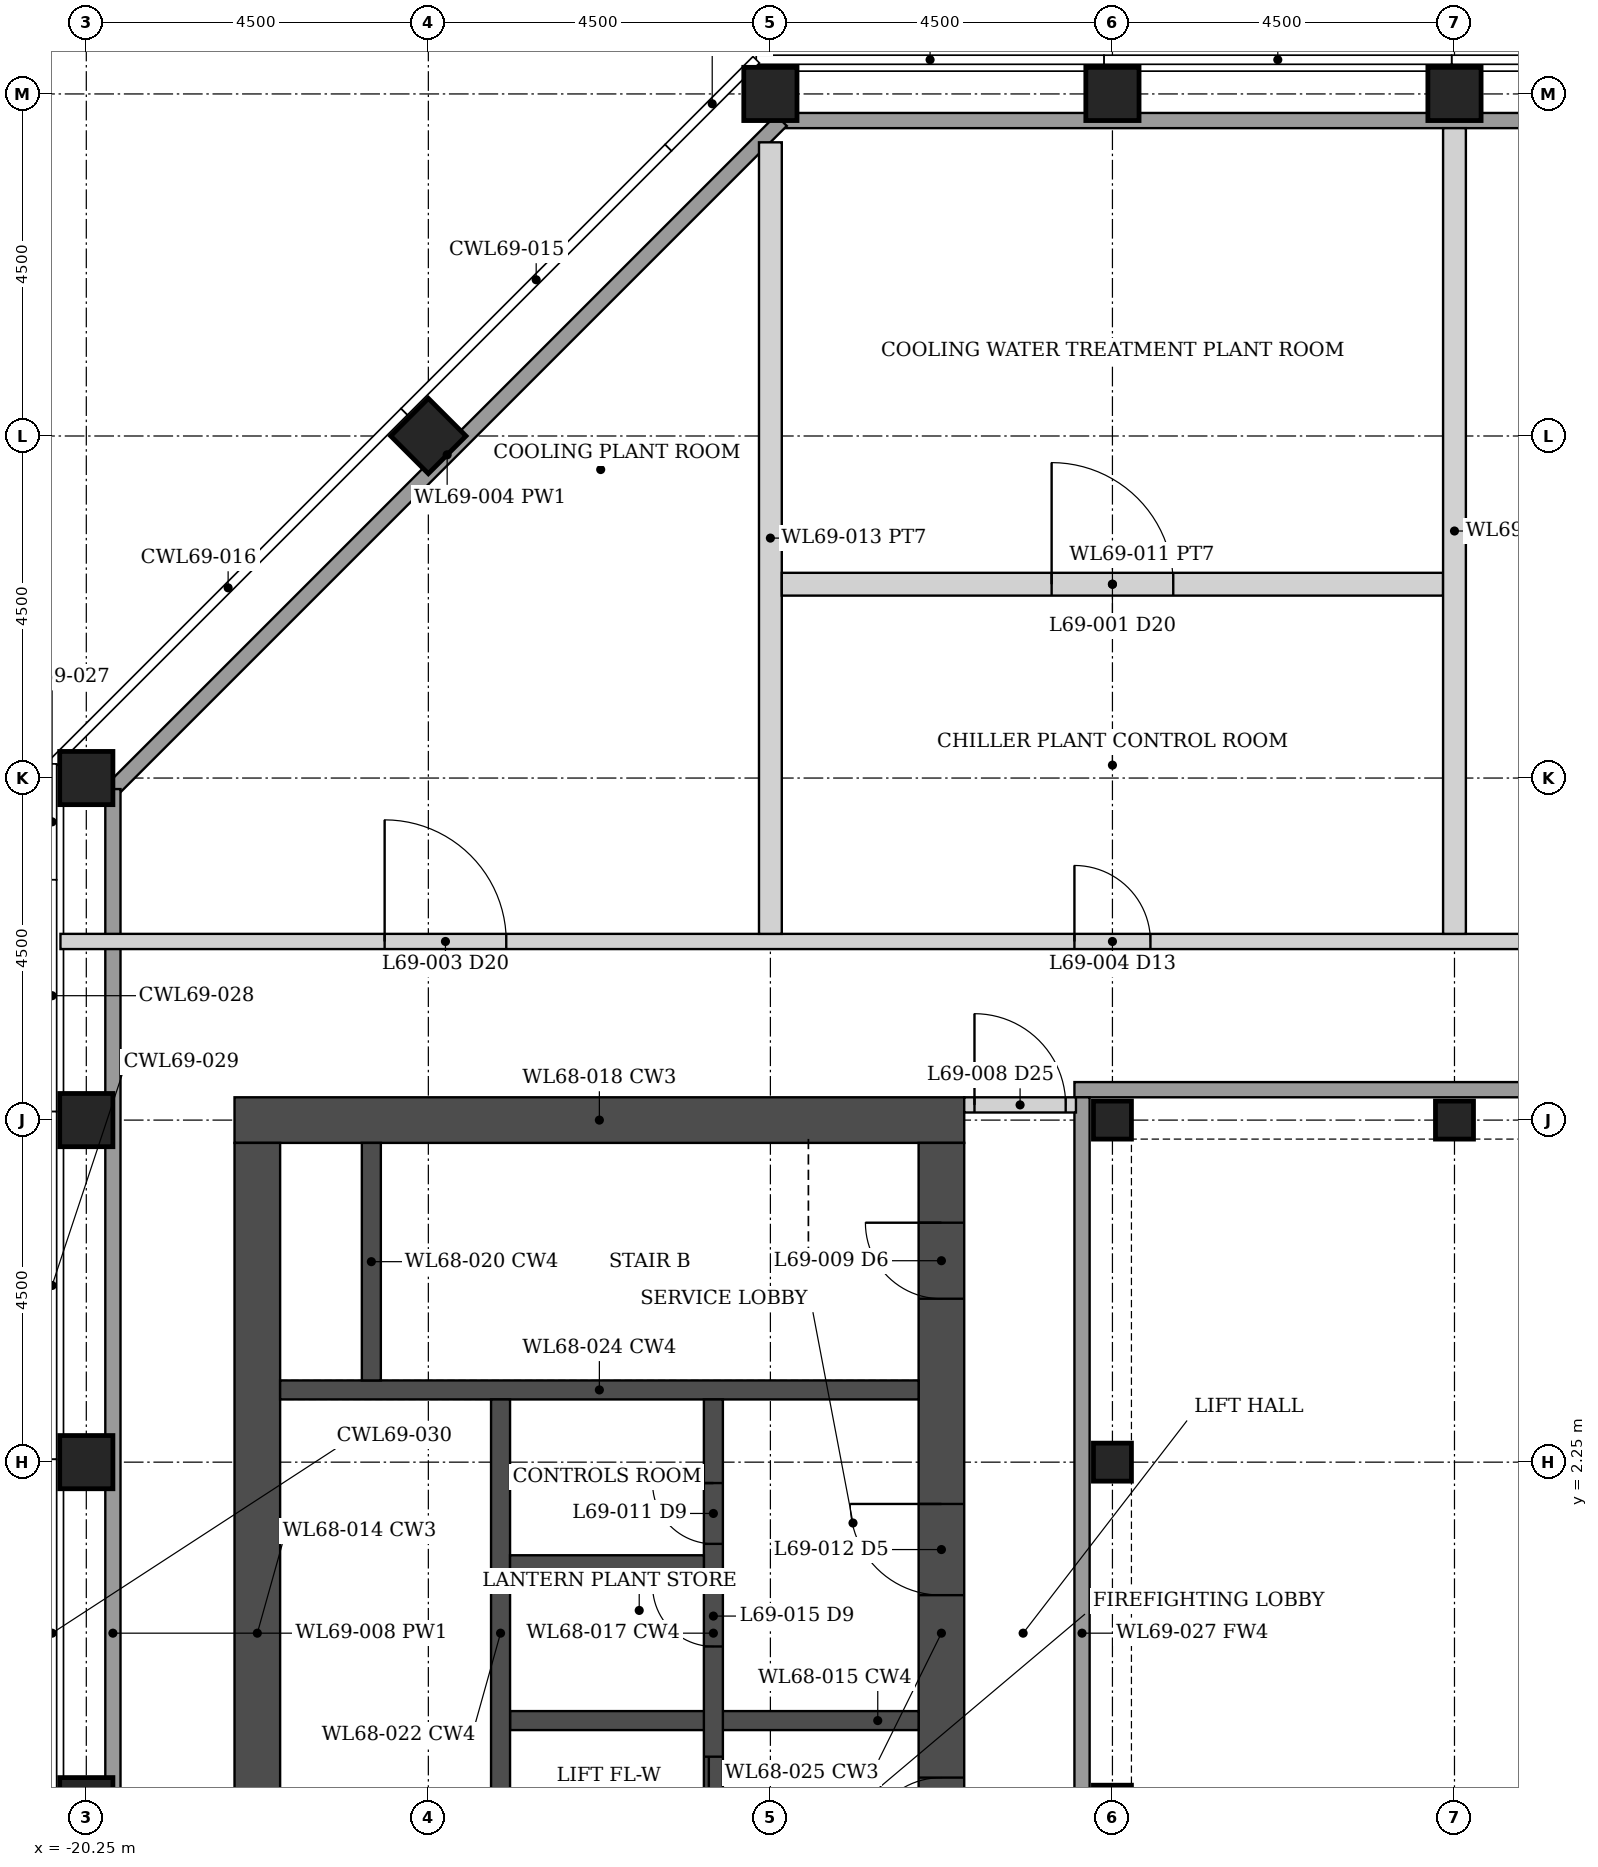
"""IFC4 building model, lengths in metres.
Left out: names, types, materials, properties, quantities, classifications, styles, units other than length and angle.
Written with IfcOpenShell. Run it as: python <this file> out.ifc"""

import sys

from ifc_helpers import new_model, si_unit, direction, frame, frame_2d, origin, origin_2d, place, context, subcontext, project, spatial, rectangle, hollow_rectangle, extrude, element, fill, save


model = new_model("IFC4")
c1 = context("Model", 3, precision=1e-05, world=origin(), true_north=direction((0.0, 1.0)))
c2 = subcontext(c1, "Body", "Model", "MODEL_VIEW")
j1 = project(units=[si_unit("LENGTHUNIT", "METRE"), si_unit("PLANEANGLEUNIT", "RADIAN")], contexts=[c1])
p1 = place(None, origin())
s1 = spatial("IfcSite", under=j1, at=p1, CompositionType="ELEMENT")
p2 = place(p1, origin())
s2 = spatial("IfcBuilding", under=s1, at=p2, CompositionType="ELEMENT")
p3 = place(p2, frame((0.0, 0.0, 268.05)))
s3 = spatial("IfcBuildingStorey", under=s2, at=p3, CompositionType="ELEMENT", Elevation=268.05)
for number, where, z_axis, x_axis in (
    (1, (-11.25, 20.25, 0.0), (0.0, 0.0, 1.0), (0.0, 1.0, 0.0)),
    (2, (-6.75, 20.25, 0.0), (0.0, 0.0, 1.0), (0.0, 1.0, 0.0)),
    (3, (-2.25, 20.25, 0.0), (0.0, 0.0, 1.0), (0.0, 1.0, 0.0)),
    (4, (-20.25, -2.25, 0.0), (0.0, 0.0, 1.0), (1.0, 0.0, 0.0)),
    (5, (-20.25, 2.25, 0.0), (0.0, 0.0, 1.0), (1.0, 0.0, 0.0)),
    (6, (-20.25, 6.75, 0.0), (0.0, 0.0, 1.0), (1.0, 0.0, 0.0)),
    (7, (-20.25, 11.25, 0.0), (0.0, 0.0, 1.0), (1.0, 0.0, 0.0)),
    (8, (-15.75, 15.75, 0.0), (0.0, 0.0, 1.0), (0.707, -0.707, 0.0)),
):
    element("IfcColumn", number, at=place(p3, frame(where, z_axis=z_axis, x_axis=x_axis)), inside=s3, PredefinedType="COLUMN", context=c2, shape_type="SweptSolid", body=[
        extrude(hollow_rectangle(XDim=0.7, YDim=0.7, WallThickness=0.035, at=origin_2d()), origin(), (0.0, 0.0, 1.0), 6.0),
    ])
for number, where, z_axis, x_axis in (
    (9, (-6.75, -2.25, 0.0), (0.0, 0.0, 1.0), (1.0, 0.0, 0.0)),
    (10, (-6.75, 2.25, 0.0), (0.0, 0.0, 1.0), (1.0, 0.0, 0.0)),
    (11, (-6.75, 6.75, 0.0), (0.0, 0.0, 1.0), (1.0, 0.0, 0.0)),
    (12, (-2.25, 6.75, 0.0), (0.0, 0.0, 1.0), (1.0, 0.0, 0.0)),
):
    element("IfcColumn", number, at=place(p3, frame(where, z_axis=z_axis, x_axis=x_axis)), inside=s3, PredefinedType="COLUMN", context=c2, shape_type="SweptSolid", body=[
        extrude(hollow_rectangle(XDim=0.5, YDim=0.5, WallThickness=0.025, at=origin_2d()), origin(), (0.0, 0.0, 1.0), 6.0),
    ])
p4 = place(p3, frame((-8.7, 6.75, 0.0), z_axis=(0.0, 0.0, 1.0), x_axis=(-1.0, 0.0, 0.0)))
e13 = element("IfcWall", 13, at=p4, inside=s3, PredefinedType="SHEAR", context=c2, shape_type="SweptSolid", body=[
    extrude(rectangle(XDim=9.6, YDim=0.6, at=frame_2d((4.8, 0.0))), origin(), (0.0, 0.0, 1.0), 6.0),
])
p5 = place(p3, frame((-9.0, -6.45, 0.0), z_axis=(0.0, 0.0, 1.0), x_axis=(0.0, 1.0, 0.0)))
e14 = element("IfcWall", 14, at=p5, inside=s3, PredefinedType="SHEAR", context=c2, shape_type="SweptSolid", body=[
    extrude(rectangle(XDim=12.9, YDim=0.6, at=frame_2d((6.45, 0.0))), origin(), (0.0, 0.0, 1.0), 6.0),
])
p6 = place(p5, frame((3.55, 0.0, 0.0)))
e15 = element("IfcOpeningElement", 15, at=p6, cuts=e14, PredefinedType="OPENING", context=c2, shape_type="SweptSolid", body=[
    extrude(rectangle(XDim=1.0, YDim=2.1, at=frame_2d((0.5, 1.05))), frame((0.0, 0.31, 0.0), z_axis=(0.0, -1.0, 0.0), x_axis=(1.0, 0.0, 0.0)), (0.0, 0.0, 1.0), 0.62),
])
p7 = place(p5, frame((6.95, 0.0, 0.0)))
e16 = element("IfcOpeningElement", 16, at=p7, cuts=e14, PredefinedType="OPENING", context=c2, shape_type="SweptSolid", body=[
    extrude(rectangle(XDim=1.2, YDim=2.1, at=frame_2d((0.6, 1.05))), frame((0.0, 0.31, 0.0), z_axis=(0.0, -1.0, 0.0), x_axis=(1.0, 0.0, 0.0)), (0.0, 0.0, 1.0), 0.62),
])
p8 = place(p5, frame((10.85, 0.0, 0.0)))
e17 = element("IfcOpeningElement", 17, at=p8, cuts=e14, PredefinedType="OPENING", context=c2, shape_type="SweptSolid", body=[
    extrude(rectangle(XDim=1.0, YDim=2.1, at=frame_2d((0.5, 1.05))), frame((0.0, 0.31, 0.0), z_axis=(0.0, -1.0, 0.0), x_axis=(1.0, 0.0, 0.0)), (0.0, 0.0, 1.0), 0.62),
])
p9 = place(p3, frame((-18.0, -6.45, 0.0), z_axis=(0.0, 0.0, 1.0), x_axis=(0.0, 1.0, 0.0)))
e18 = element("IfcWall", 18, at=p9, inside=s3, PredefinedType="SHEAR", context=c2, shape_type="SweptSolid", body=[
    extrude(rectangle(XDim=12.9, YDim=0.6, at=frame_2d((6.45, 0.0))), origin(), (0.0, 0.0, 1.0), 6.0),
])
p10 = place(p3, frame((-9.3, 3.2, 0.0), z_axis=(0.0, 0.0, 1.0), x_axis=(-1.0, 0.0, 0.0)))
e19 = element("IfcWall", 19, at=p10, inside=s3, PredefinedType="SHEAR", context=c2, shape_type="SweptSolid", body=[
    extrude(rectangle(XDim=8.4, YDim=0.25, at=frame_2d((4.2, 0.0))), origin(), (0.0, 0.0, 1.0), 6.0),
])
p11 = place(p3, frame((-16.5, 3.325, 0.0), z_axis=(0.0, 0.0, 1.0), x_axis=(0.0, 1.0, 0.0)))
e20 = element("IfcWall", 20, at=p11, inside=s3, PredefinedType="SHEAR", context=c2, shape_type="SweptSolid", body=[
    extrude(rectangle(XDim=3.125, YDim=0.25, at=frame_2d((1.562, 0.0))), origin(), (0.0, 0.0, 1.0), 6.0),
])
p12 = place(p3, frame((-9.3, -1.15, 0.0), z_axis=(0.0, 0.0, 1.0), x_axis=(-1.0, 0.0, 0.0)))
e21 = element("IfcWall", 21, at=p12, inside=s3, PredefinedType="SHEAR", context=c2, shape_type="SweptSolid", body=[
    extrude(rectangle(XDim=5.375, YDim=0.25, at=frame_2d((2.688, 0.0))), origin(), (0.0, 0.0, 1.0), 6.0),
])
p13 = place(p3, frame((-12.0, -3.075, 0.0), z_axis=(0.0, 0.0, 1.0), x_axis=(0.0, 1.0, 0.0)))
e22 = element("IfcWall", 22, at=p13, inside=s3, PredefinedType="SHEAR", context=c2, shape_type="SweptSolid", body=[
    extrude(rectangle(XDim=6.15, YDim=0.25, at=frame_2d((3.075, 0.0))), origin(), (0.0, 0.0, 1.0), 6.0),
])
p14 = place(p13, frame((2.9, 0.0, 0.0)))
e23 = element("IfcOpeningElement", 23, at=p14, cuts=e22, PredefinedType="OPENING", context=c2, shape_type="SweptSolid", body=[
    extrude(rectangle(XDim=0.8, YDim=2.1, at=frame_2d((0.4, 1.05))), frame((0.0, 0.135, 0.0), z_axis=(0.0, -1.0, 0.0), x_axis=(1.0, 0.0, 0.0)), (0.0, 0.0, 1.0), 0.27),
])
p15 = place(p13, frame((4.25, 0.0, 0.0)))
e24 = element("IfcOpeningElement", 24, at=p15, cuts=e22, PredefinedType="OPENING", context=c2, shape_type="SweptSolid", body=[
    extrude(rectangle(XDim=0.8, YDim=2.1, at=frame_2d((0.4, 1.05))), frame((0.0, 0.135, 0.0), z_axis=(0.0, -1.0, 0.0), x_axis=(1.0, 0.0, 0.0)), (0.0, 0.0, 1.0), 0.27),
])
p16 = place(p13, frame((0.35, 0.0, 0.0)))
e25 = element("IfcOpeningElement", 25, at=p16, cuts=e22, PredefinedType="OPENING", context=c2, shape_type="SweptSolid", body=[
    extrude(rectangle(XDim=1.1, YDim=2.1, at=frame_2d((0.55, 1.05))), frame((0.0, 0.135, 0.0), z_axis=(0.0, -1.0, 0.0), x_axis=(1.0, 0.0, 0.0)), (0.0, 0.0, 1.0), 0.27),
])
p17 = place(p3, frame((-14.8, -3.075, 0.0), z_axis=(0.0, 0.0, 1.0), x_axis=(0.0, 1.0, 0.0)))
e26 = element("IfcWall", 26, at=p17, inside=s3, PredefinedType="SHEAR", context=c2, shape_type="SweptSolid", body=[
    extrude(rectangle(XDim=6.15, YDim=0.25, at=frame_2d((3.075, 0.0))), origin(), (0.0, 0.0, 1.0), 6.0),
])
p18 = place(p3, frame((-12.125, 0.9, 0.0), z_axis=(0.0, 0.0, 1.0), x_axis=(-1.0, 0.0, 0.0)))
e27 = element("IfcWall", 27, at=p18, inside=s3, PredefinedType="SHEAR", context=c2, shape_type="SweptSolid", body=[
    extrude(rectangle(XDim=2.55, YDim=0.25, at=frame_2d((1.275, 0.0))), origin(), (0.0, 0.0, 1.0), 6.0),
])
p19 = place(p3, frame((-7.25, 7.15, 0.0), z_axis=(0.0, 0.0, 1.0), x_axis=(1.0, 0.0, 0.0)))
e28 = element("IfcWall", 28, at=p19, inside=s3, PredefinedType="SOLIDWALL", context=c2, shape_type="SweptSolid", body=[
    extrude(rectangle(XDim=14.5, YDim=0.2, at=frame_2d((7.25, 0.0))), origin(), (0.0, 0.0, 1.0), 4.829),
])
p20 = place(p3, frame((-7.15, -7.05, 0.0), z_axis=(0.0, 0.0, 1.0), x_axis=(0.0, 1.0, 0.0)))
e29 = element("IfcWall", 29, at=p20, inside=s3, PredefinedType="SOLIDWALL", context=c2, shape_type="SweptSolid", body=[
    extrude(rectangle(XDim=14.1, YDim=0.2, at=frame_2d((7.05, 0.0))), origin(), (0.0, 0.0, 1.0), 4.829),
])
p21 = place(p3, frame((-11.105, 19.9, 6.0), z_axis=(0.0, 0.0, 1.0), x_axis=(1.0, 0.0, 0.0)))
e30 = element("IfcWall", 30, at=p21, inside=s3, PredefinedType="PARAPET", context=c2, shape_type="SweptSolid", body=[
    extrude(rectangle(XDim=22.21, YDim=0.2, at=frame_2d((11.105, 0.0))), origin(), (0.0, 0.0, 1.0), 1.1),
])
p22 = place(p3, frame((-19.9, 11.105, 6.0), z_axis=(0.0, 0.0, 1.0), x_axis=(0.707106781187, 0.707106781187, 0.0)))
e31 = element("IfcWall", 31, at=p22, inside=s3, PredefinedType="PARAPET", context=c2, shape_type="SweptSolid", body=[
    extrude(rectangle(XDim=12.438, YDim=0.2, at=frame_2d((6.219, 0.0))), origin(), (0.0, 0.0, 1.0), 1.1),
])
p23 = place(p3, frame((-19.9, -11.105, 6.0), z_axis=(0.0, 0.0, 1.0), x_axis=(0.0, 1.0, 0.0)))
e32 = element("IfcWall", 32, at=p23, inside=s3, PredefinedType="PARAPET", context=c2, shape_type="SweptSolid", body=[
    extrude(rectangle(XDim=22.21, YDim=0.2, at=frame_2d((11.105, 0.0))), origin(), (0.0, 0.0, 1.0), 1.1),
])
p24 = place(p3, frame((-8.7, 6.95, 0.0), z_axis=(0.0, 0.0, 1.0), x_axis=(1.0, 0.0, 0.0)))
e33 = element("IfcWall", 33, at=p24, inside=s3, PredefinedType="PARTITIONING", context=c2, shape_type="SweptSolid", body=[
    extrude(rectangle(XDim=1.47, YDim=0.2, at=frame_2d((0.735, 0.0))), origin(), (0.0, 0.0, 1.0), 4.829),
])
p25 = place(p24, frame((0.135, 0.0, 0.0)))
e34 = element("IfcOpeningElement", 34, at=p25, cuts=e33, PredefinedType="OPENING", context=c2, shape_type="SweptSolid", body=[
    extrude(rectangle(XDim=1.2, YDim=2.1, at=frame_2d((0.6, 1.05))), frame((0.0, 0.11, 0.0), z_axis=(0.0, -1.0, 0.0), x_axis=(1.0, 0.0, 0.0)), (0.0, 0.0, 1.0), 0.22),
])
p26 = place(p3, frame((-20.59, 9.1, 0.0), z_axis=(0.0, 0.0, 1.0), x_axis=(1.0, 0.0, 0.0)))
e35 = element("IfcWall", 35, at=p26, inside=s3, PredefinedType="PARTITIONING", context=c2, shape_type="SweptSolid", body=[
    extrude(rectangle(XDim=41.18, YDim=0.2, at=frame_2d((20.59, 0.0))), origin(), (0.0, 0.0, 1.0), 4.829),
])
p27 = place(p26, frame((4.265, 0.0, 0.0)))
e36 = element("IfcOpeningElement", 36, at=p27, cuts=e35, PredefinedType="OPENING", context=c2, shape_type="SweptSolid", body=[
    extrude(rectangle(XDim=1.6, YDim=2.4, at=frame_2d((0.8, 1.2))), frame((0.0, 0.11, 0.0), z_axis=(0.0, -1.0, 0.0), x_axis=(1.0, 0.0, 0.0)), (0.0, 0.0, 1.0), 0.22),
])
p28 = place(p26, frame((13.34, 0.0, 0.0)))
e37 = element("IfcOpeningElement", 37, at=p28, cuts=e35, PredefinedType="OPENING", context=c2, shape_type="SweptSolid", body=[
    extrude(rectangle(XDim=1.0, YDim=2.1, at=frame_2d((0.5, 1.05))), frame((0.0, 0.11, 0.0), z_axis=(0.0, -1.0, 0.0), x_axis=(1.0, 0.0, 0.0)), (0.0, 0.0, 1.0), 0.22),
])
p29 = place(p26, frame((22.04, 0.0, 0.0)))
e38 = element("IfcOpeningElement", 38, at=p29, cuts=e35, PredefinedType="OPENING", context=c2, shape_type="SweptSolid", body=[
    extrude(rectangle(XDim=1.6, YDim=2.4, at=frame_2d((0.8, 1.2))), frame((0.0, 0.11, 0.0), z_axis=(0.0, -1.0, 0.0), x_axis=(1.0, 0.0, 0.0)), (0.0, 0.0, 1.0), 0.22),
])
p30 = place(p26, frame((29.09, 0.0, 0.0)))
e39 = element("IfcOpeningElement", 39, at=p30, cuts=e35, PredefinedType="OPENING", context=c2, shape_type="SweptSolid", body=[
    extrude(rectangle(XDim=1.0, YDim=2.1, at=frame_2d((0.5, 1.05))), frame((0.0, 0.11, 0.0), z_axis=(0.0, -1.0, 0.0), x_axis=(1.0, 0.0, 0.0)), (0.0, 0.0, 1.0), 0.22),
])
p31 = place(p26, frame((35.315, 0.0, 0.0)))
e40 = element("IfcOpeningElement", 40, at=p31, cuts=e35, PredefinedType="OPENING", context=c2, shape_type="SweptSolid", body=[
    extrude(rectangle(XDim=1.6, YDim=2.4, at=frame_2d((0.8, 1.2))), frame((0.0, 0.11, 0.0), z_axis=(0.0, -1.0, 0.0), x_axis=(1.0, 0.0, 0.0)), (0.0, 0.0, 1.0), 0.22),
])
p32 = place(p3, frame((-11.25, 9.2, 0.0), z_axis=(0.0, 0.0, 1.0), x_axis=(0.0, 1.0, 0.0)))
e41 = element("IfcWall", 41, at=p32, inside=s3, PredefinedType="PARTITIONING", context=c2, shape_type="SweptSolid", body=[
    extrude(rectangle(XDim=10.414, YDim=0.3, at=frame_2d((5.207, 0.0))), origin(), (0.0, 0.0, 1.0), 4.829),
])
p33 = place(p3, frame((-11.1, 13.8, 0.0), z_axis=(0.0, 0.0, 1.0), x_axis=(1.0, 0.0, 0.0)))
e42 = element("IfcWall", 42, at=p33, inside=s3, PredefinedType="PARTITIONING", context=c2, shape_type="SweptSolid", body=[
    extrude(rectangle(XDim=8.7, YDim=0.3, at=frame_2d((4.35, 0.0))), origin(), (0.0, 0.0, 1.0), 4.829),
])
p34 = place(p33, frame((3.55, 0.0, 0.0)))
e43 = element("IfcOpeningElement", 43, at=p34, cuts=e42, PredefinedType="OPENING", context=c2, shape_type="SweptSolid", body=[
    extrude(rectangle(XDim=1.6, YDim=2.4, at=frame_2d((0.8, 1.2))), frame((0.0, 0.16, 0.0), z_axis=(0.0, -1.0, 0.0), x_axis=(1.0, 0.0, 0.0)), (0.0, 0.0, 1.0), 0.32),
])
p35 = place(p3, frame((-2.25, 9.2, 0.0), z_axis=(0.0, 0.0, 1.0), x_axis=(0.0, 1.0, 0.0)))
e44 = element("IfcWall", 44, at=p35, inside=s3, PredefinedType="PARTITIONING", context=c2, shape_type="SweptSolid", body=[
    extrude(rectangle(XDim=10.6, YDim=0.3, at=frame_2d((5.3, 0.0))), origin(), (0.0, 0.0, 1.0), 4.829),
])
p36 = place(p25, origin())
e45 = element("IfcDoor", 45, at=p36, inside=s3, OperationType="DOUBLE_DOOR_DOUBLE_SWING", PredefinedType="DOOR", context=c2, shape_type="SweptSolid", body=[
    extrude(rectangle(XDim=1.2, YDim=2.1, at=frame_2d((0.6, 1.05))), frame((0.0, 0.025, 0.0), z_axis=(0.0, -1.0, 0.0), x_axis=(1.0, 0.0, 0.0)), (0.0, 0.0, 1.0), 0.05),
])
fill(e34, e45)
p37 = place(p27, origin())
e46 = element("IfcDoor", 46, at=p37, inside=s3, OperationType="SINGLE_SWING_LEFT", PredefinedType="DOOR", context=c2, shape_type="SweptSolid", body=[
    extrude(rectangle(XDim=1.6, YDim=2.4, at=frame_2d((0.8, 1.2))), frame((0.0, 0.025, 0.0), z_axis=(0.0, -1.0, 0.0), x_axis=(1.0, 0.0, 0.0)), (0.0, 0.0, 1.0), 0.05),
])
fill(e36, e46)
p38 = place(p28, origin())
e47 = element("IfcDoor", 47, at=p38, inside=s3, OperationType="SINGLE_SWING_LEFT", PredefinedType="DOOR", context=c2, shape_type="SweptSolid", body=[
    extrude(rectangle(XDim=1.0, YDim=2.1, at=frame_2d((0.5, 1.05))), frame((0.0, 0.025, 0.0), z_axis=(0.0, -1.0, 0.0), x_axis=(1.0, 0.0, 0.0)), (0.0, 0.0, 1.0), 0.05),
])
fill(e37, e47)
p39 = place(p34, origin())
e48 = element("IfcDoor", 48, at=p39, inside=s3, OperationType="SINGLE_SWING_LEFT", PredefinedType="DOOR", context=c2, shape_type="SweptSolid", body=[
    extrude(rectangle(XDim=1.6, YDim=2.4, at=frame_2d((0.8, 1.2))), frame((0.0, 0.025, 0.0), z_axis=(0.0, -1.0, 0.0), x_axis=(1.0, 0.0, 0.0)), (0.0, 0.0, 1.0), 0.05),
])
fill(e43, e48)
p40 = place(p6, origin())
e49 = element("IfcDoor", 49, at=p40, inside=s3, OperationType="SINGLE_SWING_LEFT", PredefinedType="DOOR", context=c2, shape_type="SweptSolid", body=[
    extrude(rectangle(XDim=1.0, YDim=2.1, at=frame_2d((0.5, 1.05))), frame((0.0, 0.025, 0.0), z_axis=(0.0, -1.0, 0.0), x_axis=(1.0, 0.0, 0.0)), (0.0, 0.0, 1.0), 0.05),
])
fill(e15, e49)
p41 = place(p7, origin())
e50 = element("IfcDoor", 50, at=p41, inside=s3, OperationType="SINGLE_SWING_RIGHT", PredefinedType="DOOR", context=c2, shape_type="SweptSolid", body=[
    extrude(rectangle(XDim=1.2, YDim=2.1, at=frame_2d((0.6, 1.05))), frame((0.0, 0.025, 0.0), z_axis=(0.0, -1.0, 0.0), x_axis=(1.0, 0.0, 0.0)), (0.0, 0.0, 1.0), 0.05),
])
fill(e16, e50)
p42 = place(p14, origin())
e51 = element("IfcDoor", 51, at=p42, inside=s3, OperationType="SINGLE_SWING_RIGHT", PredefinedType="DOOR", context=c2, shape_type="SweptSolid", body=[
    extrude(rectangle(XDim=0.8, YDim=2.1, at=frame_2d((0.4, 1.05))), frame((0.0, 0.025, 0.0), z_axis=(0.0, -1.0, 0.0), x_axis=(1.0, 0.0, 0.0)), (0.0, 0.0, 1.0), 0.05),
])
fill(e23, e51)
p43 = place(p15, origin())
e52 = element("IfcDoor", 52, at=p43, inside=s3, OperationType="SINGLE_SWING_RIGHT", PredefinedType="DOOR", context=c2, shape_type="SweptSolid", body=[
    extrude(rectangle(XDim=0.8, YDim=2.1, at=frame_2d((0.4, 1.05))), frame((0.0, 0.025, 0.0), z_axis=(0.0, -1.0, 0.0), x_axis=(1.0, 0.0, 0.0)), (0.0, 0.0, 1.0), 0.05),
])
fill(e24, e52)
p44 = place(p8, origin())
e53 = element("IfcDoor", 53, at=p44, inside=s3, OperationType="SINGLE_SWING_RIGHT", PredefinedType="DOOR", context=c2, shape_type="SweptSolid", body=[
    extrude(rectangle(XDim=1.0, YDim=2.1, at=frame_2d((0.5, 1.05))), frame((0.0, 0.025, 0.0), z_axis=(0.0, -1.0, 0.0), x_axis=(1.0, 0.0, 0.0)), (0.0, 0.0, 1.0), 0.05),
])
fill(e17, e53)
p45 = place(p16, origin())
e54 = element("IfcDoor", 54, at=p45, inside=s3, OperationType="DOUBLE_DOOR_SLIDING", PredefinedType="DOOR", context=c2, shape_type="SweptSolid", body=[
    extrude(rectangle(XDim=1.1, YDim=2.1, at=frame_2d((0.55, 1.05))), frame((0.0, 0.025, 0.0), z_axis=(0.0, -1.0, 0.0), x_axis=(1.0, 0.0, 0.0)), (0.0, 0.0, 1.0), 0.05),
])
fill(e25, e54)
save(model, sys.argv[1])
